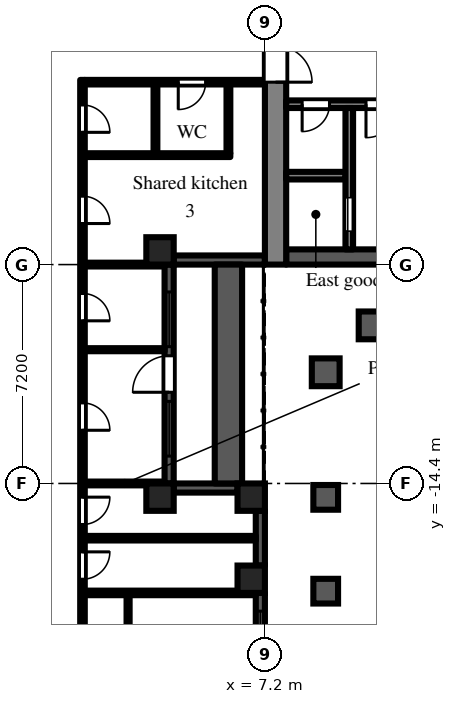
"""IFC4 building model, lengths in metres.
Left out: names, types, materials, properties, quantities, classifications, styles, units other than length and angle.
Written with IfcOpenShell. Run it as: python <this file> out.ifc"""

import sys

from ifc_helpers import new_model, si_unit, direction, frame, frame_2d, origin, origin_2d, place, context, subcontext, project, spatial, rectangle, extrude, element, fill, save


model = new_model("IFC4")
c1 = context("Model", 3, precision=1e-05, world=origin(), true_north=direction((0.0, 1.0)))
c2 = subcontext(c1, "Body", "Model", "MODEL_VIEW")
j1 = project(units=[si_unit("LENGTHUNIT", "METRE"), si_unit("PLANEANGLEUNIT", "RADIAN")], contexts=[c1])
p1 = place(None, origin())
s1 = spatial("IfcSite", under=j1, at=p1, CompositionType="ELEMENT")
p2 = place(p1, origin())
s2 = spatial("IfcBuilding", under=s1, at=p2, CompositionType="ELEMENT")
p3 = place(p2, frame((0.0, 0.0, 59.7)))
s3 = spatial("IfcBuildingStorey", under=s2, at=p3, CompositionType="ELEMENT", Elevation=59.7)
for number, where, z_axis, x_axis in (
    (1, (3.75, -14.85, 0.0), (0.0, 0.0, 1.0), (1.0, 0.0, 0.0)),
    (2, (3.75, -6.75, 0.0), (0.0, 0.0, 1.0), (1.0, 0.0, 0.0)),
    (3, (6.75, -17.55, 0.0), (0.0, 0.0, 1.0), (1.0, 0.0, 0.0)),
    (4, (6.75, -14.85, 0.0), (0.0, 0.0, 1.0), (1.0, 0.0, 0.0)),
):
    element("IfcColumn", number, at=place(p3, frame(where, z_axis=z_axis, x_axis=x_axis)), inside=s3, PredefinedType="COLUMN", context=c2, shape_type="SweptSolid", body=[
        extrude(rectangle(XDim=0.9, YDim=0.9, at=origin_2d()), origin(), (0.0, 0.0, 1.0), 3.0),
    ])
p4 = place(p3, frame((7.05, -21.15, 0.0), z_axis=(0.0, 0.0, 1.0), x_axis=(0.0, 1.0, 0.0)))
e5 = element("IfcWall", 5, at=p4, inside=s3, PredefinedType="SOLIDWALL", context=c2, shape_type="SweptSolid", body=[
    extrude(rectangle(XDim=3.15, YDim=0.3, at=frame_2d((1.575, 0.0))), origin(), (0.0, 0.0, 1.0), 2.1),
])
p5 = place(p4, frame((0.15, 0.0, 0.2)))
e6 = element("IfcOpeningElement", 6, at=p5, cuts=e5, PredefinedType="OPENING", context=c2, shape_type="SweptSolid", body=[
    extrude(rectangle(XDim=2.4, YDim=1.85, at=frame_2d((1.2, 0.925))), frame((0.0, 0.16, 0.0), z_axis=(0.0, -1.0, 0.0), x_axis=(1.0, 0.0, 0.0)), (0.0, 0.0, 1.0), 0.32),
])
p6 = place(p3, frame((7.05, -17.1, 0.0), z_axis=(0.0, 0.0, 1.0), x_axis=(0.0, 1.0, 0.0)))
e7 = element("IfcWall", 7, at=p6, inside=s3, PredefinedType="SOLIDWALL", context=c2, shape_type="SweptSolid", body=[
    extrude(rectangle(XDim=1.8, YDim=0.3, at=frame_2d((0.9, 0.0))), origin(), (0.0, 0.0, 1.0), 2.1),
])
p7 = place(p3, frame((6.3, -14.55, 0.0), z_axis=(0.0, 0.0, 1.0), x_axis=(-1.0, 0.0, 0.0)))
e8 = element("IfcWall", 8, at=p7, inside=s3, PredefinedType="SOLIDWALL", context=c2, shape_type="SweptSolid", body=[
    extrude(rectangle(XDim=2.1, YDim=0.3, at=frame_2d((1.05, 0.0))), origin(), (0.0, 0.0, 1.0), 2.55),
])
p8 = place(p3, frame((4.05, -14.4, 0.0), z_axis=(0.0, 0.0, 1.0), x_axis=(0.0, 1.0, 0.0)))
e9 = element("IfcWall", 9, at=p8, inside=s3, PredefinedType="SOLIDWALL", context=c2, shape_type="SweptSolid", body=[
    extrude(rectangle(XDim=7.2, YDim=0.3, at=frame_2d((3.6, 0.0))), origin(), (0.0, 0.0, 1.0), 2.55),
])
p9 = place(p8, frame((3.0, 0.0, 0.0)))
e10 = element("IfcOpeningElement", 10, at=p9, cuts=e9, PredefinedType="OPENING", context=c2, shape_type="SweptSolid", body=[
    extrude(rectangle(XDim=1.2, YDim=2.05, at=frame_2d((0.6, 1.025))), frame((0.0, 0.16, 0.0), z_axis=(0.0, -1.0, 0.0), x_axis=(1.0, 0.0, 0.0)), (0.0, 0.0, 1.0), 0.32),
])
p10 = place(p8, frame((0.9, 0.0, 0.2)))
e11 = element("IfcOpeningElement", 11, at=p10, cuts=e9, PredefinedType="OPENING", context=c2, shape_type="SweptSolid", body=[
    extrude(rectangle(XDim=1.8, YDim=1.85, at=frame_2d((0.9, 0.925))), frame((0.0, 0.16, 0.0), z_axis=(0.0, -1.0, 0.0), x_axis=(1.0, 0.0, 0.0)), (0.0, 0.0, 1.0), 0.32),
])
p11 = place(p8, frame((4.5, 0.0, 0.2)))
e12 = element("IfcOpeningElement", 12, at=p11, cuts=e9, PredefinedType="OPENING", context=c2, shape_type="SweptSolid", body=[
    extrude(rectangle(XDim=1.8, YDim=1.85, at=frame_2d((0.9, 0.925))), frame((0.0, 0.16, 0.0), z_axis=(0.0, -1.0, 0.0), x_axis=(1.0, 0.0, 0.0)), (0.0, 0.0, 1.0), 0.32),
])
p12 = place(p3, frame((4.2, -7.05, 0.0), z_axis=(0.0, 0.0, 1.0), x_axis=(1.0, 0.0, 0.0)))
e13 = element("IfcWall", 13, at=p12, inside=s3, PredefinedType="SOLIDWALL", context=c2, shape_type="SweptSolid", body=[
    extrude(rectangle(XDim=3.0, YDim=0.3, at=frame_2d((1.5, 0.0))), origin(), (0.0, 0.0, 1.0), 2.55),
])
p13 = place(p3, frame((6.0, -14.4, 0.0), z_axis=(0.0, 0.0, 1.0), x_axis=(0.0, 1.0, 0.0)))
e14 = element("IfcWall", 14, at=p13, inside=s3, PredefinedType="PARAPET", context=c2, shape_type="SweptSolid", body=[
    extrude(rectangle(XDim=7.2, YDim=0.9, at=frame_2d((3.6, 0.0))), origin(), (0.0, 0.0, 1.0), 0.8),
])
p14 = place(p3, frame((7.55, -7.2, 0.0), z_axis=(0.0, 0.0, 1.0), x_axis=(0.0, 1.0, 0.0)))
e15 = element("IfcWall", 15, at=p14, inside=s3, PredefinedType="SHEAR", context=c2, shape_type="SweptSolid", body=[
    extrude(rectangle(XDim=14.4, YDim=0.7, at=frame_2d((7.2, 0.0))), origin(), (0.0, 0.0, 1.0), 2.55),
])
p15 = place(p14, frame((6.0, 0.0, 0.0)))
e16 = element("IfcOpeningElement", 16, at=p15, cuts=e15, PredefinedType="OPENING", context=c2, shape_type="SweptSolid", body=[
    extrude(rectangle(XDim=2.4, YDim=2.2, at=frame_2d((1.2, 1.1))), frame((0.0, 0.36, 0.0), z_axis=(0.0, -1.0, 0.0), x_axis=(1.0, 0.0, 0.0)), (0.0, 0.0, 1.0), 0.72),
])
p16 = place(p3, frame((7.9, -6.95, 0.0), z_axis=(0.0, 0.0, 1.0), x_axis=(1.0, 0.0, 0.0)))
e17 = element("IfcWall", 17, at=p16, inside=s3, PredefinedType="SHEAR", context=c2, shape_type="SweptSolid", body=[
    extrude(rectangle(XDim=12.95, YDim=0.5, at=frame_2d((6.475, 0.0))), origin(), (0.0, 0.0, 1.0), 2.55),
])
p17 = place(p3, frame((7.9, -1.925, 0.0), z_axis=(0.0, 0.0, 1.0), x_axis=(1.0, 0.0, 0.0)))
e18 = element("IfcWall", 18, at=p17, inside=s3, PredefinedType="SHEAR", context=c2, shape_type="SweptSolid", body=[
    extrude(rectangle(XDim=12.95, YDim=0.25, at=frame_2d((6.475, 0.0))), origin(), (0.0, 0.0, 1.0), 2.55),
])
p18 = place(p17, frame((4.825, 0.0, 0.0)))
e19 = element("IfcOpeningElement", 19, at=p18, cuts=e18, PredefinedType="OPENING", context=c2, shape_type="SweptSolid", body=[
    extrude(rectangle(XDim=1.1, YDim=2.1, at=frame_2d((0.55, 1.05))), frame((0.0, 0.135, 0.0), z_axis=(0.0, -1.0, 0.0), x_axis=(1.0, 0.0, 0.0)), (0.0, 0.0, 1.0), 0.27),
])
p19 = place(p17, frame((7.025, 0.0, 0.0)))
e20 = element("IfcOpeningElement", 20, at=p19, cuts=e18, PredefinedType="OPENING", context=c2, shape_type="SweptSolid", body=[
    extrude(rectangle(XDim=1.1, YDim=2.1, at=frame_2d((0.55, 1.05))), frame((0.0, 0.135, 0.0), z_axis=(0.0, -1.0, 0.0), x_axis=(1.0, 0.0, 0.0)), (0.0, 0.0, 1.0), 0.27),
])
p20 = place(p17, frame((9.225, 0.0, 0.0)))
e21 = element("IfcOpeningElement", 21, at=p20, cuts=e18, PredefinedType="OPENING", context=c2, shape_type="SweptSolid", body=[
    extrude(rectangle(XDim=1.1, YDim=2.1, at=frame_2d((0.55, 1.05))), frame((0.0, 0.135, 0.0), z_axis=(0.0, -1.0, 0.0), x_axis=(1.0, 0.0, 0.0)), (0.0, 0.0, 1.0), 0.27),
])
p21 = place(p17, frame((0.525, 0.0, 0.0)))
e22 = element("IfcOpeningElement", 22, at=p21, cuts=e18, PredefinedType="OPENING", context=c2, shape_type="SweptSolid", body=[
    extrude(rectangle(XDim=0.9, YDim=2.1, at=frame_2d((0.45, 1.05))), frame((0.0, 0.135, 0.0), z_axis=(0.0, -1.0, 0.0), x_axis=(1.0, 0.0, 0.0)), (0.0, 0.0, 1.0), 0.27),
])
p22 = place(p17, frame((2.625, 0.0, 0.0)))
e23 = element("IfcOpeningElement", 23, at=p22, cuts=e18, PredefinedType="OPENING", context=c2, shape_type="SweptSolid", body=[
    extrude(rectangle(XDim=1.1, YDim=2.1, at=frame_2d((0.55, 1.05))), frame((0.0, 0.135, 0.0), z_axis=(0.0, -1.0, 0.0), x_axis=(1.0, 0.0, 0.0)), (0.0, 0.0, 1.0), 0.27),
])
p23 = place(p3, frame((7.9, -4.275, 0.0), z_axis=(0.0, 0.0, 1.0), x_axis=(1.0, 0.0, 0.0)))
e24 = element("IfcWall", 24, at=p23, inside=s3, PredefinedType="SHEAR", context=c2, shape_type="SweptSolid", body=[
    extrude(rectangle(XDim=1.95, YDim=0.25, at=frame_2d((0.975, 0.0))), origin(), (0.0, 0.0, 1.0), 2.55),
])
p24 = place(p3, frame((9.975, -2.05, 0.0), z_axis=(0.0, 0.0, 1.0), x_axis=(0.0, -1.0, 0.0)))
e25 = element("IfcWall", 25, at=p24, inside=s3, PredefinedType="SHEAR", context=c2, shape_type="SweptSolid", body=[
    extrude(rectangle(XDim=4.65, YDim=0.25, at=frame_2d((2.325, 0.0))), origin(), (0.0, 0.0, 1.0), 2.55),
])
p25 = place(p24, frame((2.95, 0.0, 0.0)))
e26 = element("IfcOpeningElement", 26, at=p25, cuts=e25, PredefinedType="OPENING", context=c2, shape_type="SweptSolid", body=[
    extrude(rectangle(XDim=1.1, YDim=2.1, at=frame_2d((0.55, 1.05))), frame((0.0, 0.135, 0.0), z_axis=(0.0, -1.0, 0.0), x_axis=(1.0, 0.0, 0.0)), (0.0, 0.0, 1.0), 0.27),
])
p26 = place(p3, frame((1.2, -36.5, 0.0), z_axis=(0.0, 0.0, 1.0), x_axis=(0.0, 1.0, 0.0)))
e27 = element("IfcWall", 27, at=p26, inside=s3, PredefinedType="PARTITIONING", context=c2, shape_type="SweptSolid", body=[
    extrude(rectangle(XDim=35.375, YDim=0.15, at=frame_2d((17.688, 0.0))), origin(), (0.0, 0.0, 1.0), 2.55),
])
p27 = place(p26, frame((33.65, 0.0, 0.0)))
e28 = element("IfcOpeningElement", 28, at=p27, cuts=e27, PredefinedType="OPENING", context=c2, shape_type="SweptSolid", body=[
    extrude(rectangle(XDim=0.9, YDim=2.1, at=frame_2d((0.45, 1.05))), frame((0.0, 0.085, 0.0), z_axis=(0.0, -1.0, 0.0), x_axis=(1.0, 0.0, 0.0)), (0.0, 0.0, 1.0), 0.17),
])
p28 = place(p26, frame((30.65, 0.0, 0.0)))
e29 = element("IfcOpeningElement", 29, at=p28, cuts=e27, PredefinedType="OPENING", context=c2, shape_type="SweptSolid", body=[
    extrude(rectangle(XDim=0.9, YDim=2.1, at=frame_2d((0.45, 1.05))), frame((0.0, 0.085, 0.0), z_axis=(0.0, -1.0, 0.0), x_axis=(1.0, 0.0, 0.0)), (0.0, 0.0, 1.0), 0.17),
])
p29 = place(p26, frame((27.45, 0.0, 0.0)))
e30 = element("IfcOpeningElement", 30, at=p29, cuts=e27, PredefinedType="OPENING", context=c2, shape_type="SweptSolid", body=[
    extrude(rectangle(XDim=0.9, YDim=2.1, at=frame_2d((0.45, 1.05))), frame((0.0, 0.085, 0.0), z_axis=(0.0, -1.0, 0.0), x_axis=(1.0, 0.0, 0.0)), (0.0, 0.0, 1.0), 0.17),
])
p30 = place(p26, frame((23.85, 0.0, 0.0)))
e31 = element("IfcOpeningElement", 31, at=p30, cuts=e27, PredefinedType="OPENING", context=c2, shape_type="SweptSolid", body=[
    extrude(rectangle(XDim=0.9, YDim=2.1, at=frame_2d((0.45, 1.05))), frame((0.0, 0.085, 0.0), z_axis=(0.0, -1.0, 0.0), x_axis=(1.0, 0.0, 0.0)), (0.0, 0.0, 1.0), 0.17),
])
p31 = place(p26, frame((20.75, 0.0, 0.0)))
e32 = element("IfcOpeningElement", 32, at=p31, cuts=e27, PredefinedType="OPENING", context=c2, shape_type="SweptSolid", body=[
    extrude(rectangle(XDim=0.9, YDim=2.1, at=frame_2d((0.45, 1.05))), frame((0.0, 0.085, 0.0), z_axis=(0.0, -1.0, 0.0), x_axis=(1.0, 0.0, 0.0)), (0.0, 0.0, 1.0), 0.17),
])
p32 = place(p26, frame((18.95, 0.0, 0.0)))
e33 = element("IfcOpeningElement", 33, at=p32, cuts=e27, PredefinedType="OPENING", context=c2, shape_type="SweptSolid", body=[
    extrude(rectangle(XDim=0.9, YDim=2.1, at=frame_2d((0.45, 1.05))), frame((0.0, 0.085, 0.0), z_axis=(0.0, -1.0, 0.0), x_axis=(1.0, 0.0, 0.0)), (0.0, 0.0, 1.0), 0.17),
])
p33 = place(p26, frame((1.55, 0.0, 0.0)))
e34 = element("IfcOpeningElement", 34, at=p33, cuts=e27, PredefinedType="OPENING", context=c2, shape_type="SweptSolid", body=[
    extrude(rectangle(XDim=1.0, YDim=2.1, at=frame_2d((0.5, 1.05))), frame((0.0, 0.085, 0.0), z_axis=(0.0, -1.0, 0.0), x_axis=(1.0, 0.0, 0.0)), (0.0, 0.0, 1.0), 0.17),
])
for number, where, z_axis, x_axis in (
    (35, (1.275, -18.0, 0.0), (0.0, 0.0, 1.0), (1.0, 0.0, 0.0)),
    (36, (1.275, -16.2, 0.0), (0.0, 0.0, 1.0), (1.0, 0.0, 0.0)),
):
    element("IfcWall", number, at=place(p3, frame(where, z_axis=z_axis, x_axis=x_axis)), inside=s3, PredefinedType="PARTITIONING", context=c2, shape_type="SweptSolid", body=[
        extrude(rectangle(XDim=5.625, YDim=0.15, at=frame_2d((2.812, 0.0))), origin(), (0.0, 0.0, 1.0), 2.55),
    ])
p34 = place(p3, frame((1.275, -14.4, 0.0), z_axis=(0.0, 0.0, 1.0), x_axis=(1.0, 0.0, 0.0)))
e37 = element("IfcWall", 37, at=p34, inside=s3, PredefinedType="PARTITIONING", context=c2, shape_type="SweptSolid", body=[
    extrude(rectangle(XDim=2.625, YDim=0.125, at=frame_2d((1.312, 0.0))), origin(), (0.0, 0.0, 1.0), 2.55),
])
p35 = place(p3, frame((1.275, -10.0, 0.0), z_axis=(0.0, 0.0, 1.0), x_axis=(1.0, 0.0, 0.0)))
e38 = element("IfcWall", 38, at=p35, inside=s3, PredefinedType="PARTITIONING", context=c2, shape_type="SweptSolid", body=[
    extrude(rectangle(XDim=2.625, YDim=0.1, at=frame_2d((1.312, 0.0))), origin(), (0.0, 0.0, 1.0), 2.55),
])
p36 = place(p3, frame((1.275, -7.2, 0.0), z_axis=(0.0, 0.0, 1.0), x_axis=(1.0, 0.0, 0.0)))
e39 = element("IfcWall", 39, at=p36, inside=s3, PredefinedType="PARTITIONING", context=c2, shape_type="SweptSolid", body=[
    extrude(rectangle(XDim=2.625, YDim=0.125, at=frame_2d((1.312, 0.0))), origin(), (0.0, 0.0, 1.0), 2.55),
])
p37 = place(p3, frame((1.275, -3.6, 0.0), z_axis=(0.0, 0.0, 1.0), x_axis=(1.0, 0.0, 0.0)))
e40 = element("IfcWall", 40, at=p37, inside=s3, PredefinedType="PARTITIONING", context=c2, shape_type="SweptSolid", body=[
    extrude(rectangle(XDim=4.788, YDim=0.125, at=frame_2d((2.394, 0.0))), origin(), (0.0, 0.0, 1.0), 2.55),
])
p38 = place(p3, frame((1.275, -1.2, 0.0), z_axis=(0.0, 0.0, 1.0), x_axis=(1.0, 0.0, 0.0)))
e41 = element("IfcWall", 41, at=p38, inside=s3, PredefinedType="PARTITIONING", context=c2, shape_type="SweptSolid", body=[
    extrude(rectangle(XDim=5.925, YDim=0.15, at=frame_2d((2.962, 0.0))), origin(), (0.0, 0.0, 1.0), 2.55),
])
p39 = place(p38, frame((3.075, 0.0, 0.0)))
e42 = element("IfcOpeningElement", 42, at=p39, cuts=e41, PredefinedType="OPENING", context=c2, shape_type="SweptSolid", body=[
    extrude(rectangle(XDim=0.9, YDim=2.1, at=frame_2d((0.45, 1.05))), frame((0.0, 0.085, 0.0), z_axis=(0.0, -1.0, 0.0), x_axis=(1.0, 0.0, 0.0)), (0.0, 0.0, 1.0), 0.17),
])
p40 = place(p3, frame((2.7, -32.35, 0.0), z_axis=(0.0, 0.0, 1.0), x_axis=(0.0, 1.0, 0.0)))
e43 = element("IfcWall", 43, at=p40, inside=s3, PredefinedType="PARTITIONING", context=c2, shape_type="SweptSolid", body=[
    extrude(rectangle(XDim=14.275, YDim=0.1, at=frame_2d((7.138, 0.0))), origin(), (0.0, 0.0, 1.0), 2.55),
])
p41 = place(p40, frame((1.12, 0.0, 0.0)))
e44 = element("IfcOpeningElement", 44, at=p41, cuts=e43, PredefinedType="OPENING", context=c2, shape_type="SweptSolid", body=[
    extrude(rectangle(XDim=0.9, YDim=2.1, at=frame_2d((0.45, 1.05))), frame((0.0, 0.06, 0.0), z_axis=(0.0, -1.0, 0.0), x_axis=(1.0, 0.0, 0.0)), (0.0, 0.0, 1.0), 0.12),
])
p42 = place(p40, frame((12.28, 0.0, 0.0)))
e45 = element("IfcOpeningElement", 45, at=p42, cuts=e43, PredefinedType="OPENING", context=c2, shape_type="SweptSolid", body=[
    extrude(rectangle(XDim=0.9, YDim=2.1, at=frame_2d((0.45, 1.05))), frame((0.0, 0.06, 0.0), z_axis=(0.0, -1.0, 0.0), x_axis=(1.0, 0.0, 0.0)), (0.0, 0.0, 1.0), 0.12),
])
for number, where, z_axis, x_axis in (
    (46, (3.6, -3.538, 0.0), (0.0, 0.0, 1.0), (0.0, 1.0, 0.0)),
    (47, (6.0, -3.538, 0.0), (0.0, 0.0, 1.0), (0.0, 1.0, 0.0)),
):
    element("IfcWall", number, at=place(p3, frame(where, z_axis=z_axis, x_axis=x_axis)), inside=s3, PredefinedType="PARTITIONING", context=c2, shape_type="SweptSolid", body=[
        extrude(rectangle(XDim=2.263, YDim=0.125, at=frame_2d((1.131, 0.0))), origin(), (0.0, 0.0, 1.0), 2.55),
    ])
p43 = place(p5, origin())
e48 = element("IfcWindow", 48, at=p43, inside=s3, PartitioningType="SINGLE_PANEL", PredefinedType="WINDOW", context=c2, shape_type="SweptSolid", body=[
    extrude(rectangle(XDim=2.4, YDim=1.85, at=frame_2d((1.2, 0.925))), frame((0.0, 0.03, 0.0), z_axis=(0.0, -1.0, 0.0), x_axis=(1.0, 0.0, 0.0)), (0.0, 0.0, 1.0), 0.06),
])
fill(e6, e48)
p44 = place(p9, origin())
e49 = element("IfcDoor", 49, at=p44, inside=s3, OperationType="SINGLE_SWING_LEFT", PredefinedType="DOOR", context=c2, shape_type="SweptSolid", body=[
    extrude(rectangle(XDim=1.2, YDim=2.05, at=frame_2d((0.6, 1.025))), frame((0.0, 0.025, 0.0), z_axis=(0.0, -1.0, 0.0), x_axis=(1.0, 0.0, 0.0)), (0.0, 0.0, 1.0), 0.05),
])
fill(e10, e49)
p45 = place(p10, origin())
e50 = element("IfcWindow", 50, at=p45, inside=s3, PartitioningType="SINGLE_PANEL", PredefinedType="WINDOW", context=c2, shape_type="SweptSolid", body=[
    extrude(rectangle(XDim=1.8, YDim=1.85, at=frame_2d((0.9, 0.925))), frame((0.0, 0.03, 0.0), z_axis=(0.0, -1.0, 0.0), x_axis=(1.0, 0.0, 0.0)), (0.0, 0.0, 1.0), 0.06),
])
fill(e11, e50)
p46 = place(p11, origin())
e51 = element("IfcWindow", 51, at=p46, inside=s3, PartitioningType="SINGLE_PANEL", PredefinedType="WINDOW", context=c2, shape_type="SweptSolid", body=[
    extrude(rectangle(XDim=1.8, YDim=1.85, at=frame_2d((0.9, 0.925))), frame((0.0, 0.03, 0.0), z_axis=(0.0, -1.0, 0.0), x_axis=(1.0, 0.0, 0.0)), (0.0, 0.0, 1.0), 0.06),
])
fill(e12, e51)
p47 = place(p25, origin())
e52 = element("IfcDoor", 52, at=p47, inside=s3, OperationType="SLIDING_TO_LEFT", PredefinedType="DOOR", context=c2, shape_type="SweptSolid", body=[
    extrude(rectangle(XDim=1.1, YDim=2.1, at=frame_2d((0.55, 1.05))), frame((0.0, 0.025, 0.0), z_axis=(0.0, -1.0, 0.0), x_axis=(1.0, 0.0, 0.0)), (0.0, 0.0, 1.0), 0.05),
])
fill(e26, e52)
p48 = place(p21, frame((0.9, 0.0, 0.0), z_axis=(0.0, 0.0, 1.0), x_axis=(-1.0, 0.0, 0.0)))
e53 = element("IfcDoor", 53, at=p48, inside=s3, OperationType="SINGLE_SWING_RIGHT", PredefinedType="DOOR", context=c2, shape_type="SweptSolid", body=[
    extrude(rectangle(XDim=0.9, YDim=2.1, at=frame_2d((0.45, 1.05))), frame((0.0, 0.025, 0.0), z_axis=(0.0, -1.0, 0.0), x_axis=(1.0, 0.0, 0.0)), (0.0, 0.0, 1.0), 0.05),
])
fill(e22, e53)
p49 = place(p22, frame((1.1, 0.0, 0.0), z_axis=(0.0, 0.0, 1.0), x_axis=(-1.0, 0.0, 0.0)))
e54 = element("IfcDoor", 54, at=p49, inside=s3, OperationType="SINGLE_SWING_RIGHT", PredefinedType="DOOR", context=c2, shape_type="SweptSolid", body=[
    extrude(rectangle(XDim=1.1, YDim=2.1, at=frame_2d((0.55, 1.05))), frame((0.0, 0.025, 0.0), z_axis=(0.0, -1.0, 0.0), x_axis=(1.0, 0.0, 0.0)), (0.0, 0.0, 1.0), 0.05),
])
fill(e23, e54)
p50 = place(p15, frame((2.4, 0.0, 0.0), z_axis=(0.0, 0.0, 1.0), x_axis=(-1.0, 0.0, 0.0)))
e55 = element("IfcDoor", 55, at=p50, inside=s3, OperationType="DOUBLE_DOOR_DOUBLE_SWING", PredefinedType="DOOR", context=c2, shape_type="SweptSolid", body=[
    extrude(rectangle(XDim=2.4, YDim=2.2, at=frame_2d((1.2, 1.1))), frame((0.0, 0.025, 0.0), z_axis=(0.0, -1.0, 0.0), x_axis=(1.0, 0.0, 0.0)), (0.0, 0.0, 1.0), 0.05),
])
fill(e16, e55)
p51 = place(p27, frame((0.9, 0.0, 0.0), z_axis=(0.0, 0.0, 1.0), x_axis=(-1.0, 0.0, 0.0)))
e56 = element("IfcDoor", 56, at=p51, inside=s3, OperationType="SINGLE_SWING_RIGHT", PredefinedType="DOOR", context=c2, shape_type="SweptSolid", body=[
    extrude(rectangle(XDim=0.9, YDim=2.1, at=frame_2d((0.45, 1.05))), frame((0.0, 0.025, 0.0), z_axis=(0.0, -1.0, 0.0), x_axis=(1.0, 0.0, 0.0)), (0.0, 0.0, 1.0), 0.05),
])
fill(e28, e56)
p52 = place(p39, frame((0.9, 0.0, 0.0), z_axis=(0.0, 0.0, 1.0), x_axis=(-1.0, 0.0, 0.0)))
e57 = element("IfcDoor", 57, at=p52, inside=s3, OperationType="SINGLE_SWING_RIGHT", PredefinedType="DOOR", context=c2, shape_type="SweptSolid", body=[
    extrude(rectangle(XDim=0.9, YDim=2.1, at=frame_2d((0.45, 1.05))), frame((0.0, 0.025, 0.0), z_axis=(0.0, -1.0, 0.0), x_axis=(1.0, 0.0, 0.0)), (0.0, 0.0, 1.0), 0.05),
])
fill(e42, e57)
p53 = place(p28, frame((0.9, 0.0, 0.0), z_axis=(0.0, 0.0, 1.0), x_axis=(-1.0, 0.0, 0.0)))
e58 = element("IfcDoor", 58, at=p53, inside=s3, OperationType="SINGLE_SWING_RIGHT", PredefinedType="DOOR", context=c2, shape_type="SweptSolid", body=[
    extrude(rectangle(XDim=0.9, YDim=2.1, at=frame_2d((0.45, 1.05))), frame((0.0, 0.025, 0.0), z_axis=(0.0, -1.0, 0.0), x_axis=(1.0, 0.0, 0.0)), (0.0, 0.0, 1.0), 0.05),
])
fill(e29, e58)
p54 = place(p29, frame((0.9, 0.0, 0.0), z_axis=(0.0, 0.0, 1.0), x_axis=(-1.0, 0.0, 0.0)))
e59 = element("IfcDoor", 59, at=p54, inside=s3, OperationType="SINGLE_SWING_RIGHT", PredefinedType="DOOR", context=c2, shape_type="SweptSolid", body=[
    extrude(rectangle(XDim=0.9, YDim=2.1, at=frame_2d((0.45, 1.05))), frame((0.0, 0.025, 0.0), z_axis=(0.0, -1.0, 0.0), x_axis=(1.0, 0.0, 0.0)), (0.0, 0.0, 1.0), 0.05),
])
fill(e30, e59)
p55 = place(p30, frame((0.9, 0.0, 0.0), z_axis=(0.0, 0.0, 1.0), x_axis=(-1.0, 0.0, 0.0)))
e60 = element("IfcDoor", 60, at=p55, inside=s3, OperationType="SINGLE_SWING_RIGHT", PredefinedType="DOOR", context=c2, shape_type="SweptSolid", body=[
    extrude(rectangle(XDim=0.9, YDim=2.1, at=frame_2d((0.45, 1.05))), frame((0.0, 0.025, 0.0), z_axis=(0.0, -1.0, 0.0), x_axis=(1.0, 0.0, 0.0)), (0.0, 0.0, 1.0), 0.05),
])
fill(e31, e60)
p56 = place(p31, frame((0.9, 0.0, 0.0), z_axis=(0.0, 0.0, 1.0), x_axis=(-1.0, 0.0, 0.0)))
e61 = element("IfcDoor", 61, at=p56, inside=s3, OperationType="SINGLE_SWING_LEFT", PredefinedType="DOOR", context=c2, shape_type="SweptSolid", body=[
    extrude(rectangle(XDim=0.9, YDim=2.1, at=frame_2d((0.45, 1.05))), frame((0.0, 0.025, 0.0), z_axis=(0.0, -1.0, 0.0), x_axis=(1.0, 0.0, 0.0)), (0.0, 0.0, 1.0), 0.05),
])
fill(e32, e61)
p57 = place(p32, frame((0.9, 0.0, 0.0), z_axis=(0.0, 0.0, 1.0), x_axis=(-1.0, 0.0, 0.0)))
e62 = element("IfcDoor", 62, at=p57, inside=s3, OperationType="SINGLE_SWING_LEFT", PredefinedType="DOOR", context=c2, shape_type="SweptSolid", body=[
    extrude(rectangle(XDim=0.9, YDim=2.1, at=frame_2d((0.45, 1.05))), frame((0.0, 0.025, 0.0), z_axis=(0.0, -1.0, 0.0), x_axis=(1.0, 0.0, 0.0)), (0.0, 0.0, 1.0), 0.05),
])
fill(e33, e62)
save(model, sys.argv[1])
